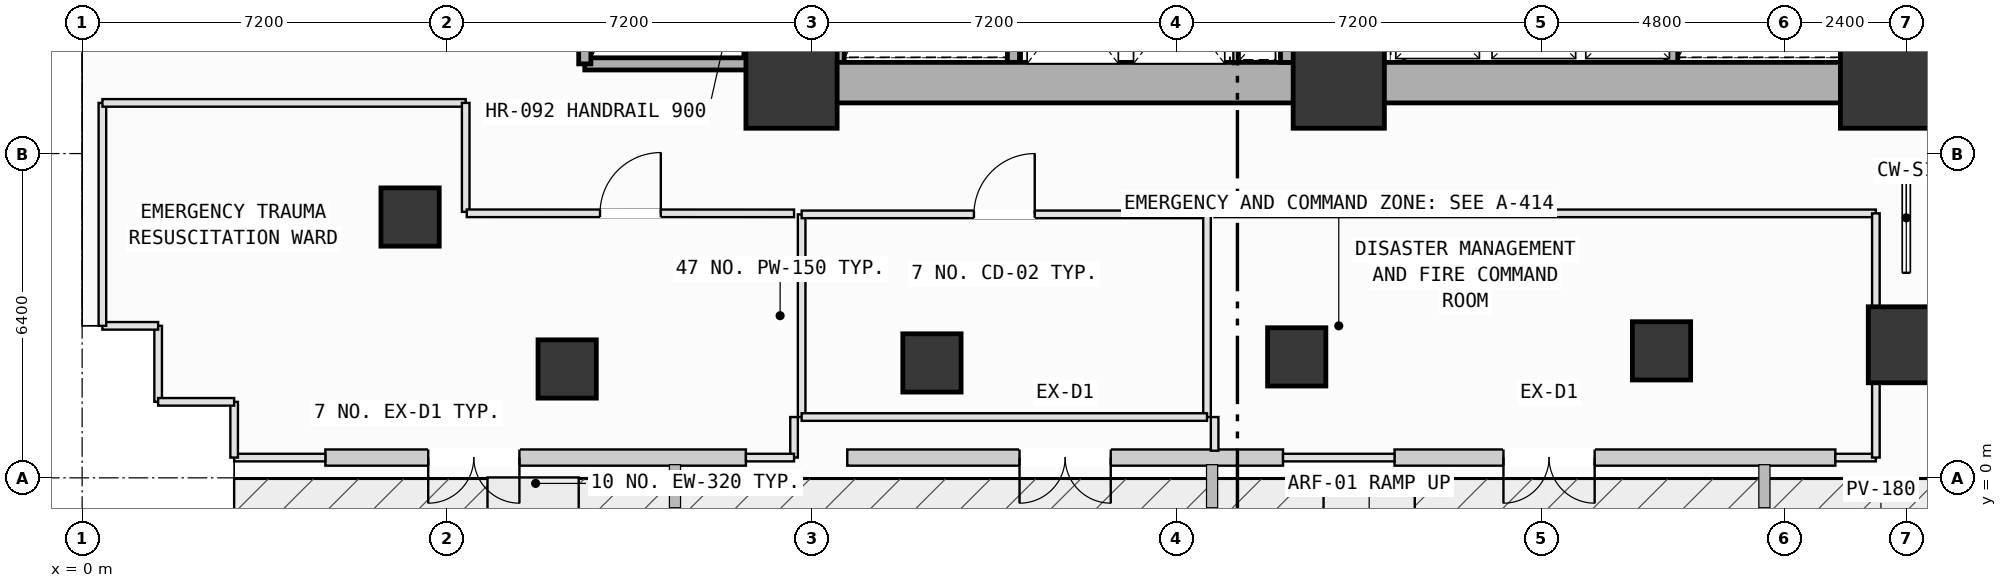
"""IFC4 building model, lengths in metres.
Left out: names, types, materials, properties, quantities, classifications, styles, units other than length and angle.
Written with IfcOpenShell. Run it as: python <this file> out.ifc"""

import sys

from ifc_helpers import new_model, si_unit, direction, frame, frame_2d, origin, origin_2d, place, context, subcontext, project, spatial, rectangle, extrude, element, fill, save


model = new_model("IFC4")
c1 = context("Model", 3, precision=1e-05, world=origin(), true_north=direction((0.0, 1.0)))
c2 = subcontext(c1, "Body", "Model", "MODEL_VIEW")
j1 = project(units=[si_unit("LENGTHUNIT", "METRE"), si_unit("PLANEANGLEUNIT", "RADIAN")], contexts=[c1])
p1 = place(None, origin())
s1 = spatial("IfcSite", under=j1, at=p1, CompositionType="ELEMENT")
p2 = place(p1, origin())
s2 = spatial("IfcBuilding", under=s1, at=p2, CompositionType="ELEMENT")
p3 = place(p2, origin())
s3 = spatial("IfcBuildingStorey", under=s2, at=p3, CompositionType="ELEMENT", Elevation=0.0)
for number, where, z_axis, x_axis in (
    (1, (14.0, 7.8, 0.0), (0.0, 0.0, 1.0), (1.0, 0.0, 0.0)),
    (2, (24.8, 7.8, 0.0), (0.0, 0.0, 1.0), (1.0, 0.0, 0.0)),
    (3, (35.6, 7.8, 0.0), (0.0, 0.0, 1.0), (1.0, 0.0, 0.0)),
):
    element("IfcColumn", number, at=place(p3, frame(where, z_axis=z_axis, x_axis=x_axis)), inside=s3, PredefinedType="COLUMN", context=c2, shape_type="SweptSolid", body=[
        extrude(rectangle(XDim=1.8, YDim=1.8, at=origin_2d()), origin(), (0.0, 0.0, 1.0), 5.4),
    ])
p4 = place(p3, frame((36.0, 2.626, 0.0), z_axis=(0.0, 0.0, 1.0), x_axis=(1.0, 0.0, 0.0)))
e4 = element("IfcColumn", 4, at=p4, inside=s3, PredefinedType="PILASTER", context=c2, shape_type="SweptSolid", body=[
    extrude(rectangle(XDim=1.5, YDim=1.5, at=origin_2d()), origin(), (0.0, 0.0, 1.0), 5.4),
])
for number, where, z_axis, x_axis in (
    (5, (9.572, 2.148, 0.0), (0.0, 0.0, 1.0), (1.0, 0.0, 0.0)),
    (6, (16.771, 2.268, 0.0), (0.0, 0.0, 1.0), (1.0, 0.0, 0.0)),
    (7, (23.97, 2.387, 0.0), (0.0, 0.0, 1.0), (1.0, 0.0, 0.0)),
    (8, (31.169, 2.507, 0.0), (0.0, 0.0, 1.0), (1.0, 0.0, 0.0)),
    (9, (6.472, 5.147, 0.0), (0.0, 0.0, 1.0), (1.0, 0.0, 0.0)),
):
    element("IfcColumn", number, at=place(p3, frame(where, z_axis=z_axis, x_axis=x_axis)), inside=s3, PredefinedType="COLUMN", context=c2, shape_type="SweptSolid", body=[
        extrude(rectangle(XDim=1.15, YDim=1.15, at=origin_2d()), origin(), (0.0, 0.0, 1.0), 5.4),
    ])
p5 = place(p3, frame((13.1, 0.4, 0.0), z_axis=(0.0, 0.0, 1.0), x_axis=(-1.0, 0.0, 0.0)))
e10 = element("IfcWall", 10, at=p5, inside=s3, PredefinedType="SOLIDWALL", context=c2, shape_type="SweptSolid", body=[
    extrude(rectangle(XDim=8.3, YDim=0.32, at=frame_2d((4.15, 0.0))), origin(), (0.0, 0.0, 1.0), 4.23),
])
p6 = place(p5, frame((4.47, 0.0, 0.0)))
e11 = element("IfcOpeningElement", 11, at=p6, cuts=e10, PredefinedType="OPENING", context=c2, shape_type="SweptSolid", body=[
    extrude(rectangle(XDim=1.8, YDim=2.25, at=frame_2d((0.9, 1.125))), frame((0.0, 0.17, 0.0), z_axis=(0.0, -1.0, 0.0), x_axis=(1.0, 0.0, 0.0)), (0.0, 0.0, 1.0), 0.34),
])
p7 = place(p3, frame((23.7, 0.4, 0.0), z_axis=(0.0, 0.0, 1.0), x_axis=(-1.0, 0.0, 0.0)))
e12 = element("IfcWall", 12, at=p7, inside=s3, PredefinedType="SOLIDWALL", context=c2, shape_type="SweptSolid", body=[
    extrude(rectangle(XDim=8.6, YDim=0.32, at=frame_2d((4.3, 0.0))), origin(), (0.0, 0.0, 1.0), 4.23),
])
p8 = place(p7, frame((3.4, 0.0, 0.0)))
e13 = element("IfcOpeningElement", 13, at=p8, cuts=e12, PredefinedType="OPENING", context=c2, shape_type="SweptSolid", body=[
    extrude(rectangle(XDim=1.8, YDim=2.25, at=frame_2d((0.9, 1.125))), frame((0.0, 0.17, 0.0), z_axis=(0.0, -1.0, 0.0), x_axis=(1.0, 0.0, 0.0)), (0.0, 0.0, 1.0), 0.34),
])
p9 = place(p3, frame((34.6, 0.4, 0.0), z_axis=(0.0, 0.0, 1.0), x_axis=(-1.0, 0.0, 0.0)))
e14 = element("IfcWall", 14, at=p9, inside=s3, PredefinedType="SOLIDWALL", context=c2, shape_type="SweptSolid", body=[
    extrude(rectangle(XDim=8.7, YDim=0.32, at=frame_2d((4.35, 0.0))), origin(), (0.0, 0.0, 1.0), 4.23),
])
p10 = place(p9, frame((4.75, 0.0, 0.0)))
e15 = element("IfcOpeningElement", 15, at=p10, cuts=e14, PredefinedType="OPENING", context=c2, shape_type="SweptSolid", body=[
    extrude(rectangle(XDim=1.8, YDim=2.25, at=frame_2d((0.9, 1.125))), frame((0.0, 0.17, 0.0), z_axis=(0.0, -1.0, 0.0), x_axis=(1.0, 0.0, 0.0)), (0.0, 0.0, 1.0), 0.34),
])
for number, where, z_axis, x_axis in (
    (16, (18.38, 15.12, 0.0), (0.0, 0.0, 1.0), (0.0, -1.0, 0.0)),
    (17, (14.92, 8.2, 0.0), (0.0, 0.0, 1.0), (0.0, 1.0, 0.0)),
    (18, (34.83, 15.12, 0.0), (0.0, 0.0, 1.0), (0.0, -1.0, 0.0)),
    (19, (31.37, 8.2, 0.0), (0.0, 0.0, 1.0), (0.0, 1.0, 0.0)),
):
    element("IfcWall", number, at=place(p3, frame(where, z_axis=z_axis, x_axis=x_axis)), inside=s3, PredefinedType="SOLIDWALL", context=c2, shape_type="SweptSolid", body=[
        extrude(rectangle(XDim=6.92, YDim=0.24, at=frame_2d((3.46, 0.0))), origin(), (0.0, 0.0, 1.0), 5.15),
    ])
p11 = place(p3, frame((13.18, 15.22, 0.0), z_axis=(0.0, 0.0, 1.0), x_axis=(0.0, -1.0, 0.0)))
e20 = element("IfcWall", 20, at=p11, inside=s3, PredefinedType="SOLIDWALL", context=c2, shape_type="SweptSolid", body=[
    extrude(rectangle(XDim=7.05, YDim=0.24, at=frame_2d((3.525, 0.0))), origin(), (0.0, 0.0, 1.0), 5.15),
])
p12 = place(p3, frame((13.18, 8.17, 0.0), z_axis=(0.0, 0.0, 1.0), x_axis=(-1.0, 0.0, 0.0)))
e21 = element("IfcWall", 21, at=p12, inside=s3, PredefinedType="SOLIDWALL", context=c2, shape_type="SweptSolid", body=[
    extrude(rectangle(XDim=3.26, YDim=0.24, at=frame_2d((1.63, 0.0))), origin(), (0.0, 0.0, 1.0), 5.15),
])
p13 = place(p3, frame((9.92, 8.17, 0.0), z_axis=(0.0, 0.0, 1.0), x_axis=(0.0, 1.0, 0.0)))
e22 = element("IfcWall", 22, at=p13, inside=s3, PredefinedType="SOLIDWALL", context=c2, shape_type="SweptSolid", body=[
    extrude(rectangle(XDim=7.05, YDim=0.24, at=frame_2d((3.525, 0.0))), origin(), (0.0, 0.0, 1.0), 5.15),
])
for number, where, z_axis, x_axis in (
    (23, (14.0, 7.8, 0.0), (0.0, 0.0, 1.0), (1.0, 0.0, 0.0)),
    (24, (24.8, 7.8, 0.0), (0.0, 0.0, 1.0), (1.0, 0.0, 0.0)),
):
    element("IfcWall", number, at=place(p3, frame(where, z_axis=z_axis, x_axis=x_axis)), inside=s3, PredefinedType="SHEAR", context=c2, shape_type="SweptSolid", body=[
        extrude(rectangle(XDim=10.8, YDim=0.8, at=frame_2d((5.4, 0.0))), origin(), (0.0, 0.0, 1.0), 5.15),
    ])
for number, where, z_axis, x_axis in (
    (25, (35.6, 7.8, 0.0), (0.0, 0.0, 1.0), (0.0, 1.0, 0.0)),
    (26, (14.0, 16.8, 0.0), (0.0, 0.0, 1.0), (0.0, -1.0, 0.0)),
):
    element("IfcWall", number, at=place(p3, frame(where, z_axis=z_axis, x_axis=x_axis)), inside=s3, PredefinedType="SHEAR", context=c2, shape_type="SweptSolid", body=[
        extrude(rectangle(XDim=9.0, YDim=0.8, at=frame_2d((4.5, 0.0))), origin(), (0.0, 0.0, 1.0), 5.15),
    ])
p14 = place(p3, frame((23.8, 8.2, 0.0), z_axis=(0.0, 0.0, 1.0), x_axis=(0.0, 1.0, 0.0)))
e27 = element("IfcWall", 27, at=p14, inside=s3, PredefinedType="SOLIDWALL", context=c2, shape_type="SweptSolid", body=[
    extrude(rectangle(XDim=2.48, YDim=0.3, at=frame_2d((1.24, 0.0))), origin(), (0.0, 0.0, 1.0), 5.15),
])
p15 = place(p3, frame((14.2, 1.2, 0.0), z_axis=(0.0, 0.0, 1.0), x_axis=(0.0, 1.0, 0.0)))
e28 = element("IfcWall", 28, at=p15, inside=s3, PredefinedType="PARTITIONING", context=c2, shape_type="SweptSolid", body=[
    extrude(rectangle(XDim=4.0, YDim=0.15, at=frame_2d((2.0, 0.0))), origin(), (0.0, 0.0, 1.0), 5.15),
])
p16 = place(p3, frame((14.2, 5.2, 0.0), z_axis=(0.0, 0.0, 1.0), x_axis=(1.0, 0.0, 0.0)))
e29 = element("IfcWall", 29, at=p16, inside=s3, PredefinedType="PARTITIONING", context=c2, shape_type="SweptSolid", body=[
    extrude(rectangle(XDim=8.0, YDim=0.15, at=frame_2d((4.0, 0.0))), origin(), (0.0, 0.0, 1.0), 5.15),
])
p17 = place(p16, frame((3.4, 0.0, 0.0)))
e30 = element("IfcOpeningElement", 30, at=p17, cuts=e29, PredefinedType="OPENING", context=c2, shape_type="SweptSolid", body=[
    extrude(rectangle(XDim=1.2, YDim=2.15, at=frame_2d((0.6, 1.075))), frame((0.0, 0.085, 0.0), z_axis=(0.0, -1.0, 0.0), x_axis=(1.0, 0.0, 0.0)), (0.0, 0.0, 1.0), 0.17),
])
p18 = place(p3, frame((22.2, 5.2, 0.0), z_axis=(0.0, 0.0, 1.0), x_axis=(0.0, -1.0, 0.0)))
e31 = element("IfcWall", 31, at=p18, inside=s3, PredefinedType="PARTITIONING", context=c2, shape_type="SweptSolid", body=[
    extrude(rectangle(XDim=4.0, YDim=0.15, at=frame_2d((2.0, 0.0))), origin(), (0.0, 0.0, 1.0), 5.15),
])
p19 = place(p3, frame((22.2, 1.2, 0.0), z_axis=(0.0, 0.0, 1.0), x_axis=(-1.0, 0.0, 0.0)))
e32 = element("IfcWall", 32, at=p19, inside=s3, PredefinedType="PARTITIONING", context=c2, shape_type="SweptSolid", body=[
    extrude(rectangle(XDim=8.0, YDim=0.15, at=frame_2d((4.0, 0.0))), origin(), (0.0, 0.0, 1.0), 5.15),
])
p20 = place(p3, frame((1.5, 1.5, 0.0), z_axis=(0.0, 0.0, 1.0), x_axis=(0.0, 1.0, 0.0)))
e33 = element("IfcWall", 33, at=p20, inside=s3, PredefinedType="PARTITIONING", context=c2, shape_type="SweptSolid", body=[
    extrude(rectangle(XDim=1.5, YDim=0.15, at=frame_2d((0.75, 0.0))), origin(), (0.0, 0.0, 1.0), 5.15),
])
p21 = place(p3, frame((1.5, 3.0, 0.0), z_axis=(0.0, 0.0, 1.0), x_axis=(-1.0, 0.0, 0.0)))
e34 = element("IfcWall", 34, at=p21, inside=s3, PredefinedType="PARTITIONING", context=c2, shape_type="SweptSolid", body=[
    extrude(rectangle(XDim=1.1, YDim=0.15, at=frame_2d((0.55, 0.0))), origin(), (0.0, 0.0, 1.0), 5.15),
])
p22 = place(p3, frame((0.4, 3.0, 0.0), z_axis=(0.0, 0.0, 1.0), x_axis=(0.0, 1.0, 0.0)))
e35 = element("IfcWall", 35, at=p22, inside=s3, PredefinedType="PARTITIONING", context=c2, shape_type="SweptSolid", body=[
    extrude(rectangle(XDim=4.4, YDim=0.15, at=frame_2d((2.2, 0.0))), origin(), (0.0, 0.0, 1.0), 5.15),
])
p23 = place(p3, frame((0.4, 7.4, 0.0), z_axis=(0.0, 0.0, 1.0), x_axis=(1.0, 0.0, 0.0)))
e36 = element("IfcWall", 36, at=p23, inside=s3, PredefinedType="PARTITIONING", context=c2, shape_type="SweptSolid", body=[
    extrude(rectangle(XDim=7.17, YDim=0.15, at=frame_2d((3.585, 0.0))), origin(), (0.0, 0.0, 1.0), 5.15),
])
p24 = place(p3, frame((7.57, 7.4, 0.0), z_axis=(0.0, 0.0, 1.0), x_axis=(0.0, -1.0, 0.0)))
e37 = element("IfcWall", 37, at=p24, inside=s3, PredefinedType="PARTITIONING", context=c2, shape_type="SweptSolid", body=[
    extrude(rectangle(XDim=2.15, YDim=0.15, at=frame_2d((1.075, 0.0))), origin(), (0.0, 0.0, 1.0), 4.235),
])
p25 = place(p3, frame((7.591, 5.221, 0.0), z_axis=(0.0, 0.0, 1.0), x_axis=(0.99999998857, -0.000151194434, 0.0)))
e38 = element("IfcWall", 38, at=p25, inside=s3, PredefinedType="PARTITIONING", context=c2, shape_type="SweptSolid", body=[
    extrude(rectangle(XDim=6.459, YDim=0.15, at=frame_2d((3.229, 0.0))), origin(), (0.0, 0.0, 1.0), 4.235),
])
p26 = place(p25, frame((2.629, 0.0, 0.0)))
e39 = element("IfcOpeningElement", 39, at=p26, cuts=e38, PredefinedType="OPENING", context=c2, shape_type="SweptSolid", body=[
    extrude(rectangle(XDim=1.2, YDim=2.15, at=frame_2d((0.6, 1.075))), frame((0.0, 0.085, 0.0), z_axis=(0.0, -1.0, 0.0), x_axis=(1.0, 0.0, 0.0)), (0.0, 0.0, 1.0), 0.17),
])
p27 = place(p3, frame((14.05, 1.2, 0.0), z_axis=(0.0, 0.0, 1.0), x_axis=(0.0, -1.0, 0.0)))
e40 = element("IfcWall", 40, at=p27, inside=s3, PredefinedType="PARTITIONING", context=c2, shape_type="SweptSolid", body=[
    extrude(rectangle(XDim=0.8, YDim=0.15, at=frame_2d((0.4, 0.0))), origin(), (0.0, 0.0, 1.0), 5.15),
])
p28 = place(p3, frame((14.05, 0.4, 0.0), z_axis=(0.0, 0.0, 1.0), x_axis=(-1.0, 0.0, 0.0)))
e41 = element("IfcWall", 41, at=p28, inside=s3, PredefinedType="PARTITIONING", context=c2, shape_type="SweptSolid", body=[
    extrude(rectangle(XDim=0.95, YDim=0.15, at=frame_2d((0.475, 0.0))), origin(), (0.0, 0.0, 1.0), 5.15),
])
p29 = place(p3, frame((4.8, 0.4, 0.0), z_axis=(0.0, 0.0, 1.0), x_axis=(-1.0, 0.0, 0.0)))
e42 = element("IfcWall", 42, at=p29, inside=s3, PredefinedType="PARTITIONING", context=c2, shape_type="SweptSolid", body=[
    extrude(rectangle(XDim=1.8, YDim=0.15, at=frame_2d((0.9, 0.0))), origin(), (0.0, 0.0, 1.0), 5.15),
])
p30 = place(p3, frame((3.0, 0.4, 0.0), z_axis=(0.0, 0.0, 1.0), x_axis=(0.0, 1.0, 0.0)))
e43 = element("IfcWall", 43, at=p30, inside=s3, PredefinedType="PARTITIONING", context=c2, shape_type="SweptSolid", body=[
    extrude(rectangle(XDim=1.1, YDim=0.15, at=frame_2d((0.55, 0.0))), origin(), (0.0, 0.0, 1.0), 5.15),
])
p31 = place(p3, frame((3.0, 1.5, 0.0), z_axis=(0.0, 0.0, 1.0), x_axis=(-1.0, 0.0, 0.0)))
e44 = element("IfcWall", 44, at=p31, inside=s3, PredefinedType="PARTITIONING", context=c2, shape_type="SweptSolid", body=[
    extrude(rectangle(XDim=1.5, YDim=0.15, at=frame_2d((0.75, 0.0))), origin(), (0.0, 0.0, 1.0), 5.15),
])
p32 = place(p3, frame((35.4, 0.4, 0.0), z_axis=(0.0, 0.0, 1.0), x_axis=(-1.0, 0.0, 0.0)))
e45 = element("IfcWall", 45, at=p32, inside=s3, PredefinedType="PARTITIONING", context=c2, shape_type="SweptSolid", body=[
    extrude(rectangle(XDim=0.8, YDim=0.15, at=frame_2d((0.4, 0.0))), origin(), (0.0, 0.0, 1.0), 5.15),
])
p33 = place(p3, frame((25.9, 0.4, 0.0), z_axis=(0.0, 0.0, 1.0), x_axis=(-1.0, 0.0, 0.0)))
e46 = element("IfcWall", 46, at=p33, inside=s3, PredefinedType="PARTITIONING", context=c2, shape_type="SweptSolid", body=[
    extrude(rectangle(XDim=2.2, YDim=0.15, at=frame_2d((1.1, 0.0))), origin(), (0.0, 0.0, 1.0), 5.15),
])
p34 = place(p3, frame((22.35, 0.535, 0.0), z_axis=(0.0, 0.0, 1.0), x_axis=(0.0, 1.0, 0.0)))
e47 = element("IfcWall", 47, at=p34, inside=s3, PredefinedType="PARTITIONING", context=c2, shape_type="SweptSolid", body=[
    extrude(rectangle(XDim=0.665, YDim=0.15, at=frame_2d((0.333, 0.0))), origin(), (0.0, 0.0, 1.0), 5.15),
])
p35 = place(p3, frame((22.35, 5.22, 0.0), z_axis=(0.0, 0.0, 1.0), x_axis=(1.0, 0.0, 0.0)))
e48 = element("IfcWall", 48, at=p35, inside=s3, PredefinedType="PARTITIONING", context=c2, shape_type="SweptSolid", body=[
    extrude(rectangle(XDim=13.05, YDim=0.15, at=frame_2d((6.525, 0.0))), origin(), (0.0, 0.0, 1.0), 5.15),
])
p36 = place(p3, frame((35.4, 5.22, 0.0), z_axis=(0.0, 0.0, 1.0), x_axis=(0.0, -1.0, 0.0)))
e49 = element("IfcWall", 49, at=p36, inside=s3, PredefinedType="PARTITIONING", context=c2, shape_type="SweptSolid", body=[
    extrude(rectangle(XDim=4.82, YDim=0.15, at=frame_2d((2.41, 0.0))), origin(), (0.0, 0.0, 1.0), 4.235),
])
p37 = place(p6, origin())
e50 = element("IfcDoor", 50, at=p37, inside=s3, OperationType="DOUBLE_DOOR_SINGLE_SWING", PredefinedType="DOOR", context=c2, shape_type="SweptSolid", body=[
    extrude(rectangle(XDim=1.8, YDim=2.25, at=frame_2d((0.9, 1.125))), frame((0.0, 0.025, 0.0), z_axis=(0.0, -1.0, 0.0), x_axis=(1.0, 0.0, 0.0)), (0.0, 0.0, 1.0), 0.05),
])
fill(e11, e50)
p38 = place(p8, origin())
e51 = element("IfcDoor", 51, at=p38, inside=s3, OperationType="DOUBLE_DOOR_SINGLE_SWING", PredefinedType="DOOR", context=c2, shape_type="SweptSolid", body=[
    extrude(rectangle(XDim=1.8, YDim=2.25, at=frame_2d((0.9, 1.125))), frame((0.0, 0.025, 0.0), z_axis=(0.0, -1.0, 0.0), x_axis=(1.0, 0.0, 0.0)), (0.0, 0.0, 1.0), 0.05),
])
fill(e13, e51)
p39 = place(p10, origin())
e52 = element("IfcDoor", 52, at=p39, inside=s3, OperationType="DOUBLE_DOOR_SINGLE_SWING", PredefinedType="DOOR", context=c2, shape_type="SweptSolid", body=[
    extrude(rectangle(XDim=1.8, YDim=2.25, at=frame_2d((0.9, 1.125))), frame((0.0, 0.025, 0.0), z_axis=(0.0, -1.0, 0.0), x_axis=(1.0, 0.0, 0.0)), (0.0, 0.0, 1.0), 0.05),
])
fill(e15, e52)
p40 = place(p17, origin())
e53 = element("IfcDoor", 53, at=p40, inside=s3, OperationType="SINGLE_SWING_RIGHT", PredefinedType="DOOR", context=c2, shape_type="SweptSolid", body=[
    extrude(rectangle(XDim=1.2, YDim=2.15, at=frame_2d((0.6, 1.075))), frame((0.0, 0.025, 0.0), z_axis=(0.0, -1.0, 0.0), x_axis=(1.0, 0.0, 0.0)), (0.0, 0.0, 1.0), 0.05),
])
fill(e30, e53)
p41 = place(p26, origin())
e54 = element("IfcDoor", 54, at=p41, inside=s3, OperationType="SINGLE_SWING_RIGHT", PredefinedType="DOOR", context=c2, shape_type="SweptSolid", body=[
    extrude(rectangle(XDim=1.2, YDim=2.15, at=frame_2d((0.6, 1.075))), frame((0.0, 0.025, 0.0), z_axis=(0.0, -1.0, 0.0), x_axis=(1.0, 0.0, 0.0)), (0.0, 0.0, 1.0), 0.05),
])
fill(e39, e54)
save(model, sys.argv[1])
